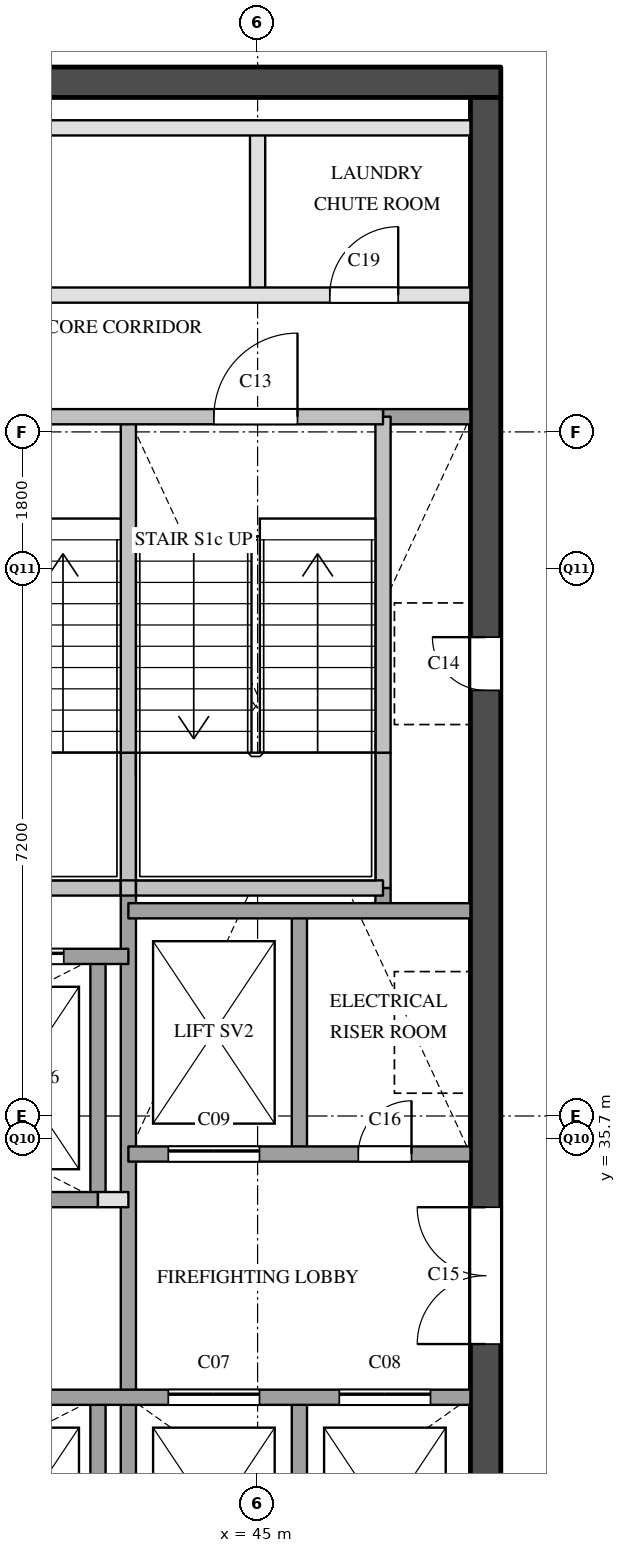
"""IFC4 building model, lengths in metres.
Left out: names, types, materials, properties, quantities, classifications, styles, units other than length and angle.
Written with IfcOpenShell. Run it as: python <this file> out.ifc"""

import sys

from ifc_helpers import new_model, si_unit, direction, frame, frame_2d, origin, place, context, subcontext, project, spatial, rectangle, extrude, element, fill, save


model = new_model("IFC4")
c1 = context("Model", 3, precision=1e-05, world=origin(), true_north=direction((0.0, 1.0)))
c2 = subcontext(c1, "Body", "Model", "MODEL_VIEW")
j1 = project(units=[si_unit("LENGTHUNIT", "METRE"), si_unit("PLANEANGLEUNIT", "RADIAN")], contexts=[c1])
p1 = place(None, origin())
s1 = spatial("IfcSite", under=j1, at=p1, CompositionType="ELEMENT")
p2 = place(p1, origin())
s2 = spatial("IfcBuilding", under=s1, at=p2, CompositionType="ELEMENT")
p3 = place(p2, frame((0.0, 0.0, 246.2)))
s3 = spatial("IfcBuildingStorey", under=s2, at=p3, CompositionType="ELEMENT", Elevation=246.2)
p4 = place(p3, frame((36.2, 49.6, 0.0), z_axis=(0.0, 0.0, 1.0), x_axis=(1.0, 0.0, 0.0)))
e1 = element("IfcWall", 1, at=p4, inside=s3, PredefinedType="SHEAR", context=c2, shape_type="SweptSolid", body=[
    extrude(rectangle(XDim=12.0, YDim=0.4, at=frame_2d((6.0, 0.0))), origin(), (0.0, 0.0, 1.0), 3.6),
])
p5 = place(p3, frame((48.0, 29.1, 0.0), z_axis=(0.0, 0.0, 1.0), x_axis=(0.0, 1.0, 0.0)))
e2 = element("IfcWall", 2, at=p5, inside=s3, PredefinedType="SHEAR", context=c2, shape_type="SweptSolid", body=[
    extrude(rectangle(XDim=20.3, YDim=0.4, at=frame_2d((10.15, 0.0))), origin(), (0.0, 0.0, 1.0), 3.6),
])
p6 = place(p5, frame((12.5, 0.0, 0.0)))
e3 = element("IfcOpeningElement", 3, at=p6, cuts=e2, PredefinedType="OPENING", context=c2, shape_type="SweptSolid", body=[
    extrude(rectangle(XDim=0.7, YDim=2.1, at=frame_2d((0.35, 1.05))), frame((0.0, 0.21, 0.0), z_axis=(0.0, -1.0, 0.0), x_axis=(1.0, 0.0, 0.0)), (0.0, 0.0, 1.0), 0.42),
])
p7 = place(p5, frame((3.9, 0.0, 0.0)))
e4 = element("IfcOpeningElement", 4, at=p7, cuts=e2, PredefinedType="OPENING", context=c2, shape_type="SweptSolid", body=[
    extrude(rectangle(XDim=1.8, YDim=2.1, at=frame_2d((0.9, 1.05))), frame((0.0, 0.21, 0.0), z_axis=(0.0, -1.0, 0.0), x_axis=(1.0, 0.0, 0.0)), (0.0, 0.0, 1.0), 0.42),
])
p8 = place(p3, frame((42.9, 29.1, 0.0), z_axis=(0.0, 0.0, 1.0), x_axis=(0.0, 1.0, 0.0)))
e5 = element("IfcWall", 5, at=p8, inside=s3, PredefinedType="SOLIDWALL", context=c2, shape_type="SweptSolid", body=[
    extrude(rectangle(XDim=3.2, YDim=0.2, at=frame_2d((1.6, 0.0))), origin(), (0.0, 0.0, 1.0), 3.6),
])
p9 = place(p3, frame((42.9, 34.9, 0.0), z_axis=(0.0, 0.0, 1.0), x_axis=(0.0, 1.0, 0.0)))
e6 = element("IfcWall", 6, at=p9, inside=s3, PredefinedType="SOLIDWALL", context=c2, shape_type="SweptSolid", body=[
    extrude(rectangle(XDim=3.2, YDim=0.2, at=frame_2d((1.6, 0.0))), origin(), (0.0, 0.0, 1.0), 3.6),
])
p10 = place(p3, frame((43.3, 29.1, 0.0), z_axis=(0.0, 0.0, 1.0), x_axis=(0.0, 1.0, 0.0)))
e7 = element("IfcWall", 7, at=p10, inside=s3, PredefinedType="SOLIDWALL", context=c2, shape_type="SweptSolid", body=[
    extrude(rectangle(XDim=9.9, YDim=0.2, at=frame_2d((4.95, 0.0))), origin(), (0.0, 0.0, 1.0), 3.6),
])
p11 = place(p3, frame((43.3, 39.0, 0.0), z_axis=(0.0, 0.0, 1.0), x_axis=(0.0, 1.0, 0.0)))
e8 = element("IfcWall", 8, at=p11, inside=s3, PredefinedType="SOLIDWALL", context=c2, shape_type="SweptSolid", body=[
    extrude(rectangle(XDim=1.78, YDim=0.2, at=frame_2d((0.89, 0.0))), origin(), (0.0, 0.0, 1.0), 3.6),
])
p12 = place(p3, frame((43.3, 40.78, 0.0), z_axis=(0.0, 0.0, 1.0), x_axis=(0.0, 1.0, 0.0)))
e9 = element("IfcWall", 9, at=p12, inside=s3, PredefinedType="SOLIDWALL", context=c2, shape_type="SweptSolid", body=[
    extrude(rectangle(XDim=4.42, YDim=0.2, at=frame_2d((2.21, 0.0))), origin(), (0.0, 0.0, 1.0), 3.6),
])
p13 = place(p3, frame((45.0, 46.8, 0.0), z_axis=(0.0, 0.0, 1.0), x_axis=(0.0, 1.0, 0.0)))
e10 = element("IfcWall", 10, at=p13, inside=s3, PredefinedType="PARTITIONING", context=c2, shape_type="SweptSolid", body=[
    extrude(rectangle(XDim=2.2, YDim=0.2, at=frame_2d((1.1, 0.0))), origin(), (0.0, 0.0, 1.0), 3.6),
])
for number, where, z_axis, x_axis in (
    (11, (45.55, 29.1, 0.0), (0.0, 0.0, 1.0), (0.0, 1.0, 0.0)),
    (12, (45.55, 35.5, 0.0), (0.0, 0.0, 1.0), (0.0, 1.0, 0.0)),
):
    element("IfcWall", number, at=place(p3, frame(where, z_axis=z_axis, x_axis=x_axis)), inside=s3, PredefinedType="SOLIDWALL", context=c2, shape_type="SweptSolid", body=[
        extrude(rectangle(XDim=3.2, YDim=0.2, at=frame_2d((1.6, 0.0))), origin(), (0.0, 0.0, 1.0), 3.6),
    ])
p14 = place(p3, frame((46.65, 38.7, 0.0), z_axis=(0.0, 0.0, 1.0), x_axis=(0.0, 1.0, 0.0)))
e13 = element("IfcWall", 13, at=p14, inside=s3, PredefinedType="SOLIDWALL", context=c2, shape_type="SweptSolid", body=[
    extrude(rectangle(XDim=0.3, YDim=0.2, at=frame_2d((0.15, 0.0))), origin(), (0.0, 0.0, 1.0), 3.6),
])
p15 = place(p3, frame((46.65, 39.0, 0.0), z_axis=(0.0, 0.0, 1.0), x_axis=(0.0, 1.0, 0.0)))
e14 = element("IfcWall", 14, at=p15, inside=s3, PredefinedType="SOLIDWALL", context=c2, shape_type="SweptSolid", body=[
    extrude(rectangle(XDim=1.78, YDim=0.2, at=frame_2d((0.89, 0.0))), origin(), (0.0, 0.0, 1.0), 3.6),
])
p16 = place(p3, frame((46.65, 40.78, 0.0), z_axis=(0.0, 0.0, 1.0), x_axis=(0.0, 1.0, 0.0)))
e15 = element("IfcWall", 15, at=p16, inside=s3, PredefinedType="SOLIDWALL", context=c2, shape_type="SweptSolid", body=[
    extrude(rectangle(XDim=4.42, YDim=0.2, at=frame_2d((2.21, 0.0))), origin(), (0.0, 0.0, 1.0), 3.6),
])
p17 = place(p3, frame((36.6, 32.3, 0.0), z_axis=(0.0, 0.0, 1.0), x_axis=(1.0, 0.0, 0.0)))
e16 = element("IfcWall", 16, at=p17, inside=s3, PredefinedType="SOLIDWALL", context=c2, shape_type="SweptSolid", body=[
    extrude(rectangle(XDim=11.2, YDim=0.2, at=frame_2d((5.6, 0.0))), origin(), (0.0, 0.0, 1.0), 3.6),
])
p18 = place(p17, frame((7.225, 0.0, 0.0)))
e17 = element("IfcOpeningElement", 17, at=p18, cuts=e16, PredefinedType="OPENING", context=c2, shape_type="SweptSolid", body=[
    extrude(rectangle(XDim=1.2, YDim=2.1, at=frame_2d((0.6, 1.05))), frame((0.0, 0.11, 0.0), z_axis=(0.0, -1.0, 0.0), x_axis=(1.0, 0.0, 0.0)), (0.0, 0.0, 1.0), 0.22),
])
p19 = place(p17, frame((9.475, 0.0, 0.0)))
e18 = element("IfcOpeningElement", 18, at=p19, cuts=e16, PredefinedType="OPENING", context=c2, shape_type="SweptSolid", body=[
    extrude(rectangle(XDim=1.2, YDim=2.1, at=frame_2d((0.6, 1.05))), frame((0.0, 0.11, 0.0), z_axis=(0.0, -1.0, 0.0), x_axis=(1.0, 0.0, 0.0)), (0.0, 0.0, 1.0), 0.22),
])
p20 = place(p3, frame((42.9, 34.9, 0.0), z_axis=(0.0, 0.0, 1.0), x_axis=(1.0, 0.0, 0.0)))
e19 = element("IfcWall", 19, at=p20, inside=s3, PredefinedType="PARTITIONING", context=c2, shape_type="SweptSolid", body=[
    extrude(rectangle(XDim=0.4, YDim=0.2, at=frame_2d((0.2, 0.0))), origin(), (0.0, 0.0, 1.0), 3.6),
])
p21 = place(p3, frame((36.6, 34.9, 0.0), z_axis=(0.0, 0.0, 1.0), x_axis=(1.0, 0.0, 0.0)))
e20 = element("IfcWall", 20, at=p21, inside=s3, PredefinedType="SOLIDWALL", context=c2, shape_type="SweptSolid", body=[
    extrude(rectangle(XDim=6.3, YDim=0.2, at=frame_2d((3.15, 0.0))), origin(), (0.0, 0.0, 1.0), 3.6),
])
p22 = place(p3, frame((43.3, 35.5, 0.0), z_axis=(0.0, 0.0, 1.0), x_axis=(1.0, 0.0, 0.0)))
e21 = element("IfcWall", 21, at=p22, inside=s3, PredefinedType="SOLIDWALL", context=c2, shape_type="SweptSolid", body=[
    extrude(rectangle(XDim=4.5, YDim=0.2, at=frame_2d((2.25, 0.0))), origin(), (0.0, 0.0, 1.0), 3.6),
])
p23 = place(p22, frame((0.525, 0.0, 0.0)))
e22 = element("IfcOpeningElement", 22, at=p23, cuts=e21, PredefinedType="OPENING", context=c2, shape_type="SweptSolid", body=[
    extrude(rectangle(XDim=1.2, YDim=2.1, at=frame_2d((0.6, 1.05))), frame((0.0, 0.11, 0.0), z_axis=(0.0, -1.0, 0.0), x_axis=(1.0, 0.0, 0.0)), (0.0, 0.0, 1.0), 0.22),
])
p24 = place(p22, frame((3.025, 0.0, 0.0)))
e23 = element("IfcOpeningElement", 23, at=p24, cuts=e21, PredefinedType="OPENING", context=c2, shape_type="SweptSolid", body=[
    extrude(rectangle(XDim=0.7, YDim=2.1, at=frame_2d((0.35, 1.05))), frame((0.0, 0.11, 0.0), z_axis=(0.0, -1.0, 0.0), x_axis=(1.0, 0.0, 0.0)), (0.0, 0.0, 1.0), 0.22),
])
p25 = place(p3, frame((36.6, 38.1, 0.0), z_axis=(0.0, 0.0, 1.0), x_axis=(1.0, 0.0, 0.0)))
e24 = element("IfcWall", 24, at=p25, inside=s3, PredefinedType="SOLIDWALL", context=c2, shape_type="SweptSolid", body=[
    extrude(rectangle(XDim=6.7, YDim=0.2, at=frame_2d((3.35, 0.0))), origin(), (0.0, 0.0, 1.0), 3.6),
])
p26 = place(p25, frame((0.45, 0.0, 0.0)))
e25 = element("IfcOpeningElement", 25, at=p26, cuts=e24, PredefinedType="OPENING", context=c2, shape_type="SweptSolid", body=[
    extrude(rectangle(XDim=1.2, YDim=2.1, at=frame_2d((0.6, 1.05))), frame((0.0, 0.11, 0.0), z_axis=(0.0, -1.0, 0.0), x_axis=(1.0, 0.0, 0.0)), (0.0, 0.0, 1.0), 0.22),
])
p27 = place(p25, frame((2.55, 0.0, 0.0)))
e26 = element("IfcOpeningElement", 26, at=p27, cuts=e24, PredefinedType="OPENING", context=c2, shape_type="SweptSolid", body=[
    extrude(rectangle(XDim=1.2, YDim=2.1, at=frame_2d((0.6, 1.05))), frame((0.0, 0.11, 0.0), z_axis=(0.0, -1.0, 0.0), x_axis=(1.0, 0.0, 0.0)), (0.0, 0.0, 1.0), 0.22),
])
p28 = place(p25, frame((4.65, 0.0, 0.0)))
e27 = element("IfcOpeningElement", 27, at=p28, cuts=e24, PredefinedType="OPENING", context=c2, shape_type="SweptSolid", body=[
    extrude(rectangle(XDim=1.2, YDim=2.1, at=frame_2d((0.6, 1.05))), frame((0.0, 0.11, 0.0), z_axis=(0.0, -1.0, 0.0), x_axis=(1.0, 0.0, 0.0)), (0.0, 0.0, 1.0), 0.22),
])
p29 = place(p3, frame((43.3, 38.7, 0.0), z_axis=(0.0, 0.0, 1.0), x_axis=(1.0, 0.0, 0.0)))
e28 = element("IfcWall", 28, at=p29, inside=s3, PredefinedType="SOLIDWALL", context=c2, shape_type="SweptSolid", body=[
    extrude(rectangle(XDim=4.5, YDim=0.2, at=frame_2d((2.25, 0.0))), origin(), (0.0, 0.0, 1.0), 3.6),
])
p30 = place(p3, frame((40.05, 39.0, 0.0), z_axis=(0.0, 0.0, 1.0), x_axis=(1.0, 0.0, 0.0)))
e29 = element("IfcWall", 29, at=p30, inside=s3, PredefinedType="SOLIDWALL", context=c2, shape_type="SweptSolid", body=[
    extrude(rectangle(XDim=3.15, YDim=0.2, at=frame_2d((1.575, 0.0))), origin(), (0.0, 0.0, 1.0), 3.6),
])
p31 = place(p3, frame((43.2, 39.0, 0.0), z_axis=(0.0, 0.0, 1.0), x_axis=(1.0, 0.0, 0.0)))
e30 = element("IfcWall", 30, at=p31, inside=s3, PredefinedType="SOLIDWALL", context=c2, shape_type="SweptSolid", body=[
    extrude(rectangle(XDim=0.2, YDim=0.2, at=frame_2d((0.1, 0.0))), origin(), (0.0, 0.0, 1.0), 3.6),
])
p32 = place(p3, frame((43.4, 39.0, 0.0), z_axis=(0.0, 0.0, 1.0), x_axis=(1.0, 0.0, 0.0)))
e31 = element("IfcWall", 31, at=p32, inside=s3, PredefinedType="SOLIDWALL", context=c2, shape_type="SweptSolid", body=[
    extrude(rectangle(XDim=3.25, YDim=0.2, at=frame_2d((1.625, 0.0))), origin(), (0.0, 0.0, 1.0), 3.6),
])
p33 = place(p3, frame((46.65, 45.2, 0.0), z_axis=(0.0, 0.0, 1.0), x_axis=(1.0, 0.0, 0.0)))
e32 = element("IfcWall", 32, at=p33, inside=s3, PredefinedType="SOLIDWALL", context=c2, shape_type="SweptSolid", body=[
    extrude(rectangle(XDim=1.15, YDim=0.2, at=frame_2d((0.575, 0.0))), origin(), (0.0, 0.0, 1.0), 3.6),
])
p34 = place(p3, frame((36.6, 45.2, 0.0), z_axis=(0.0, 0.0, 1.0), x_axis=(1.0, 0.0, 0.0)))
e33 = element("IfcWall", 33, at=p34, inside=s3, PredefinedType="SOLIDWALL", context=c2, shape_type="SweptSolid", body=[
    extrude(rectangle(XDim=10.05, YDim=0.2, at=frame_2d((5.025, 0.0))), origin(), (0.0, 0.0, 1.0), 3.6),
])
p35 = place(p34, frame((1.125, 0.0, 0.0)))
e34 = element("IfcOpeningElement", 34, at=p35, cuts=e33, PredefinedType="OPENING", context=c2, shape_type="SweptSolid", body=[
    extrude(rectangle(XDim=1.1, YDim=2.1, at=frame_2d((0.55, 1.05))), frame((0.0, 0.11, 0.0), z_axis=(0.0, -1.0, 0.0), x_axis=(1.0, 0.0, 0.0)), (0.0, 0.0, 1.0), 0.22),
])
p36 = place(p34, frame((4.475, 0.0, 0.0)))
e35 = element("IfcOpeningElement", 35, at=p36, cuts=e33, PredefinedType="OPENING", context=c2, shape_type="SweptSolid", body=[
    extrude(rectangle(XDim=1.1, YDim=2.1, at=frame_2d((0.55, 1.05))), frame((0.0, 0.11, 0.0), z_axis=(0.0, -1.0, 0.0), x_axis=(1.0, 0.0, 0.0)), (0.0, 0.0, 1.0), 0.22),
])
p37 = place(p34, frame((7.825, 0.0, 0.0)))
e36 = element("IfcOpeningElement", 36, at=p37, cuts=e33, PredefinedType="OPENING", context=c2, shape_type="SweptSolid", body=[
    extrude(rectangle(XDim=1.1, YDim=2.1, at=frame_2d((0.55, 1.05))), frame((0.0, 0.11, 0.0), z_axis=(0.0, -1.0, 0.0), x_axis=(1.0, 0.0, 0.0)), (0.0, 0.0, 1.0), 0.22),
])
p38 = place(p3, frame((36.6, 46.8, 0.0), z_axis=(0.0, 0.0, 1.0), x_axis=(1.0, 0.0, 0.0)))
e37 = element("IfcWall", 37, at=p38, inside=s3, PredefinedType="PARTITIONING", context=c2, shape_type="SweptSolid", body=[
    extrude(rectangle(XDim=11.2, YDim=0.2, at=frame_2d((5.6, 0.0))), origin(), (0.0, 0.0, 1.0), 3.6),
])
p39 = place(p38, frame((3.75, 0.0, 0.0)))
e38 = element("IfcOpeningElement", 38, at=p39, cuts=e37, PredefinedType="OPENING", context=c2, shape_type="SweptSolid", body=[
    extrude(rectangle(XDim=0.9, YDim=2.1, at=frame_2d((0.45, 1.05))), frame((0.0, 0.11, 0.0), z_axis=(0.0, -1.0, 0.0), x_axis=(1.0, 0.0, 0.0)), (0.0, 0.0, 1.0), 0.22),
])
p40 = place(p38, frame((9.35, 0.0, 0.0)))
e39 = element("IfcOpeningElement", 39, at=p40, cuts=e37, PredefinedType="OPENING", context=c2, shape_type="SweptSolid", body=[
    extrude(rectangle(XDim=0.9, YDim=2.1, at=frame_2d((0.45, 1.05))), frame((0.0, 0.11, 0.0), z_axis=(0.0, -1.0, 0.0), x_axis=(1.0, 0.0, 0.0)), (0.0, 0.0, 1.0), 0.22),
])
p41 = place(p3, frame((36.6, 49.0, 0.0), z_axis=(0.0, 0.0, 1.0), x_axis=(1.0, 0.0, 0.0)))
e40 = element("IfcWall", 40, at=p41, inside=s3, PredefinedType="PARTITIONING", context=c2, shape_type="SweptSolid", body=[
    extrude(rectangle(XDim=11.2, YDim=0.2, at=frame_2d((5.6, 0.0))), origin(), (0.0, 0.0, 1.0), 3.6),
])
p42 = place(p28, origin())
e41 = element("IfcDoor", 41, at=p42, inside=s3, OperationType="SLIDING_TO_LEFT", PredefinedType="DOOR", context=c2, shape_type="SweptSolid", body=[
    extrude(rectangle(XDim=1.2, YDim=2.1, at=frame_2d((0.6, 1.05))), frame((0.0, 0.025, 0.0), z_axis=(0.0, -1.0, 0.0), x_axis=(1.0, 0.0, 0.0)), (0.0, 0.0, 1.0), 0.05),
])
fill(e27, e41)
p43 = place(p18, origin())
e42 = element("IfcDoor", 42, at=p43, inside=s3, OperationType="SLIDING_TO_LEFT", PredefinedType="DOOR", context=c2, shape_type="SweptSolid", body=[
    extrude(rectangle(XDim=1.2, YDim=2.1, at=frame_2d((0.6, 1.05))), frame((0.0, 0.025, 0.0), z_axis=(0.0, -1.0, 0.0), x_axis=(1.0, 0.0, 0.0)), (0.0, 0.0, 1.0), 0.05),
])
fill(e17, e42)
p44 = place(p19, origin())
e43 = element("IfcDoor", 43, at=p44, inside=s3, OperationType="SLIDING_TO_LEFT", PredefinedType="DOOR", context=c2, shape_type="SweptSolid", body=[
    extrude(rectangle(XDim=1.2, YDim=2.1, at=frame_2d((0.6, 1.05))), frame((0.0, 0.025, 0.0), z_axis=(0.0, -1.0, 0.0), x_axis=(1.0, 0.0, 0.0)), (0.0, 0.0, 1.0), 0.05),
])
fill(e18, e43)
p45 = place(p23, origin())
e44 = element("IfcDoor", 44, at=p45, inside=s3, OperationType="SLIDING_TO_LEFT", PredefinedType="DOOR", context=c2, shape_type="SweptSolid", body=[
    extrude(rectangle(XDim=1.2, YDim=2.1, at=frame_2d((0.6, 1.05))), frame((0.0, 0.025, 0.0), z_axis=(0.0, -1.0, 0.0), x_axis=(1.0, 0.0, 0.0)), (0.0, 0.0, 1.0), 0.05),
])
fill(e22, e44)
p46 = place(p37, origin())
e45 = element("IfcDoor", 45, at=p46, inside=s3, OperationType="SINGLE_SWING_RIGHT", PredefinedType="DOOR", context=c2, shape_type="SweptSolid", body=[
    extrude(rectangle(XDim=1.1, YDim=2.1, at=frame_2d((0.55, 1.05))), frame((0.0, 0.025, 0.0), z_axis=(0.0, -1.0, 0.0), x_axis=(1.0, 0.0, 0.0)), (0.0, 0.0, 1.0), 0.05),
])
fill(e36, e45)
p47 = place(p6, origin())
e46 = element("IfcDoor", 46, at=p47, inside=s3, OperationType="SINGLE_SWING_RIGHT", PredefinedType="DOOR", context=c2, shape_type="SweptSolid", body=[
    extrude(rectangle(XDim=0.7, YDim=2.1, at=frame_2d((0.35, 1.05))), frame((0.0, 0.025, 0.0), z_axis=(0.0, -1.0, 0.0), x_axis=(1.0, 0.0, 0.0)), (0.0, 0.0, 1.0), 0.05),
])
fill(e3, e46)
p48 = place(p7, origin())
e47 = element("IfcDoor", 47, at=p48, inside=s3, OperationType="DOUBLE_DOOR_SINGLE_SWING", PredefinedType="DOOR", context=c2, shape_type="SweptSolid", body=[
    extrude(rectangle(XDim=1.8, YDim=2.1, at=frame_2d((0.9, 1.05))), frame((0.0, 0.025, 0.0), z_axis=(0.0, -1.0, 0.0), x_axis=(1.0, 0.0, 0.0)), (0.0, 0.0, 1.0), 0.05),
])
fill(e4, e47)
p49 = place(p24, origin())
e48 = element("IfcDoor", 48, at=p49, inside=s3, OperationType="SINGLE_SWING_RIGHT", PredefinedType="DOOR", context=c2, shape_type="SweptSolid", body=[
    extrude(rectangle(XDim=0.7, YDim=2.1, at=frame_2d((0.35, 1.05))), frame((0.0, 0.025, 0.0), z_axis=(0.0, -1.0, 0.0), x_axis=(1.0, 0.0, 0.0)), (0.0, 0.0, 1.0), 0.05),
])
fill(e23, e48)
p50 = place(p40, origin())
e49 = element("IfcDoor", 49, at=p50, inside=s3, OperationType="SINGLE_SWING_RIGHT", PredefinedType="DOOR", context=c2, shape_type="SweptSolid", body=[
    extrude(rectangle(XDim=0.9, YDim=2.1, at=frame_2d((0.45, 1.05))), frame((0.0, 0.025, 0.0), z_axis=(0.0, -1.0, 0.0), x_axis=(1.0, 0.0, 0.0)), (0.0, 0.0, 1.0), 0.05),
])
fill(e39, e49)
save(model, sys.argv[1])
